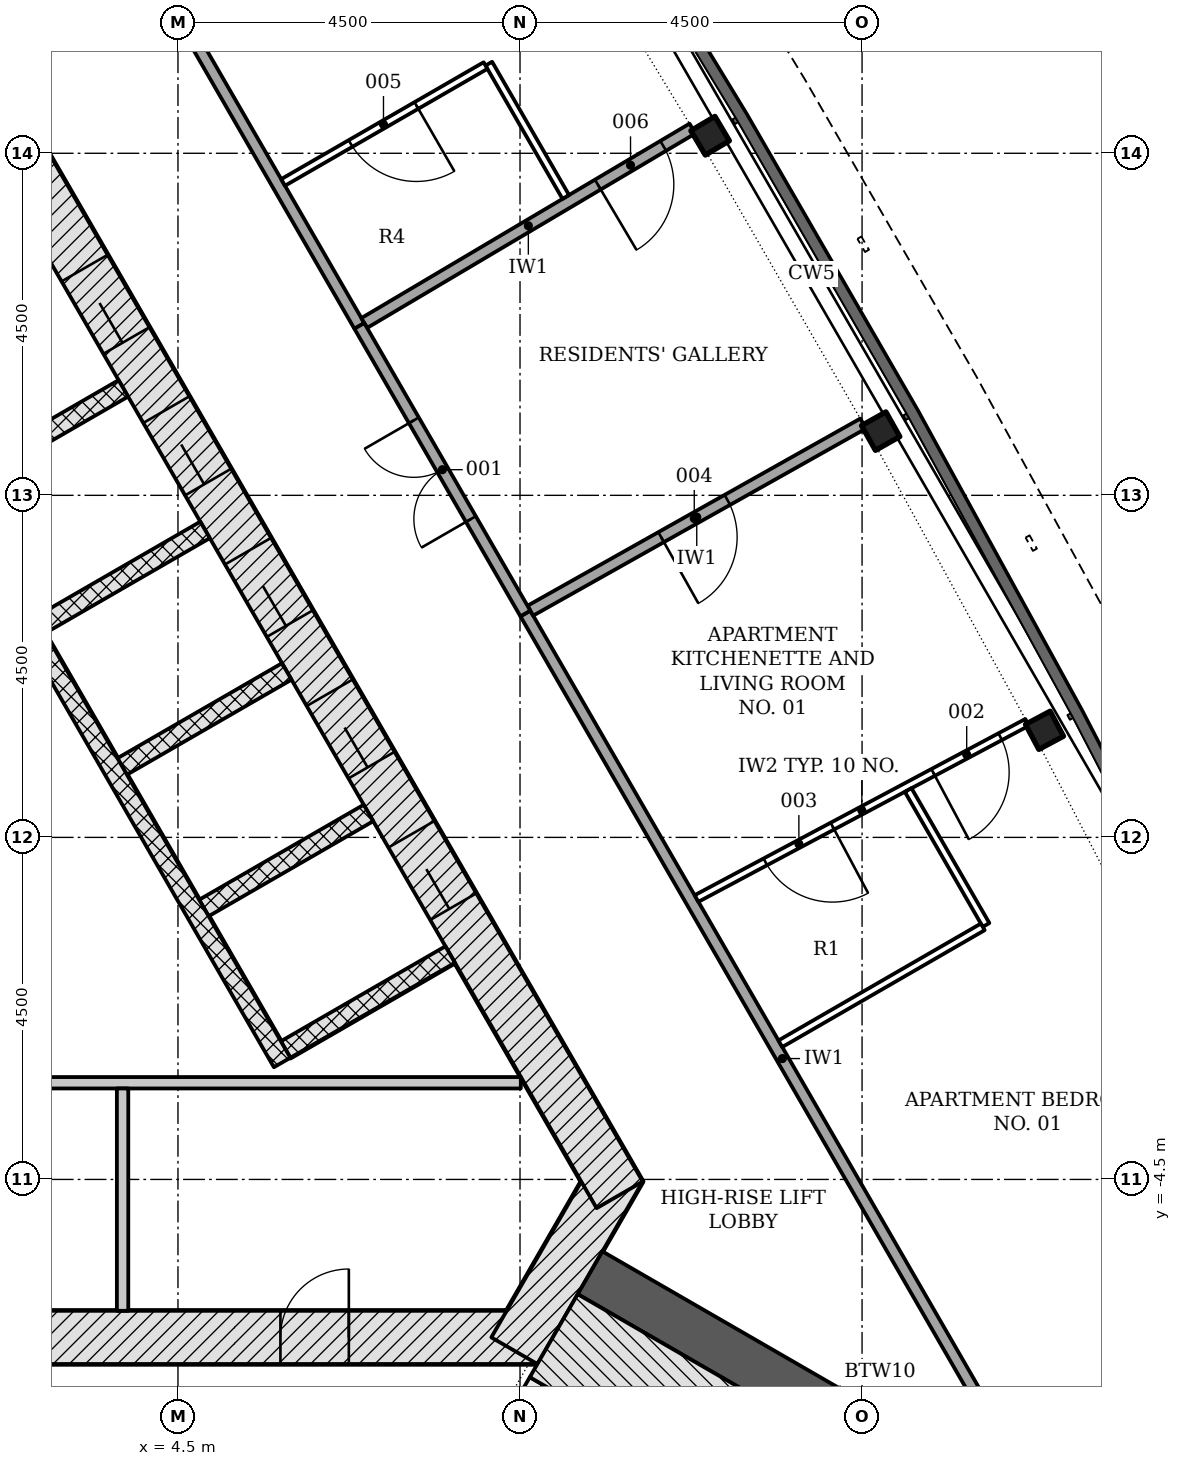
"""IFC4 building model, lengths in metres.
Left out: names, types, materials, properties, quantities, classifications, styles, units other than length and angle.
Written with IfcOpenShell. Run it as: python <this file> out.ifc"""

import sys

from ifc_helpers import new_model, si_unit, direction, frame, frame_2d, origin, origin_2d, place, context, subcontext, project, spatial, polyline, rectangle, i_section, outline, extrude, element, fill, save


model = new_model("IFC4")
c1 = context("Model", 3, precision=1e-05, world=origin(), true_north=direction((0.0, 1.0)))
c2 = subcontext(c1, "Body", "Model", "MODEL_VIEW")
j1 = project(units=[si_unit("LENGTHUNIT", "METRE"), si_unit("PLANEANGLEUNIT", "RADIAN")], contexts=[c1])
p1 = place(None, origin())
s1 = spatial("IfcSite", under=j1, at=p1, CompositionType="ELEMENT")
p2 = place(p1, origin())
s2 = spatial("IfcBuilding", under=s1, at=p2, CompositionType="ELEMENT")
p3 = place(p2, frame((0.0, 0.0, 232.8)))
s3 = spatial("IfcBuildingStorey", under=s2, at=p3, CompositionType="ELEMENT", Elevation=232.8)
p4 = place(p3, frame((-9.229, -6.578, -0.2), z_axis=(0.0, 0.0, 1.0), x_axis=(1.0, 0.0, 0.0)))
e1 = element("IfcWall", 1, at=p4, inside=s3, PredefinedType="SHEAR", context=c2, shape_type="SweptSolid", body=[
    extrude(rectangle(XDim=18.458, YDim=0.7, at=frame_2d((9.229, 0.0))), origin(), (0.0, 0.0, 1.0), 3.6),
])
p5 = place(p4, frame((7.5, 0.0, 0.2)))
e2 = element("IfcOpeningElement", 2, at=p5, cuts=e1, PredefinedType="OPENING", context=c2, shape_type="SweptSolid", body=[
    extrude(rectangle(XDim=1.0, YDim=2.1, at=frame_2d((0.5, 1.05))), frame((0.0, 0.36, 0.0), z_axis=(0.0, -1.0, 0.0), x_axis=(1.0, 0.0, 0.0)), (0.0, 0.0, 1.0), 0.72),
])
p6 = place(p4, frame((3.389, 0.0, 0.2)))
e3 = element("IfcOpeningElement", 3, at=p6, cuts=e1, PredefinedType="OPENING", context=c2, shape_type="SweptSolid", body=[
    extrude(rectangle(XDim=0.9, YDim=2.1, at=frame_2d((0.45, 1.05))), frame((0.0, 0.36, 0.0), z_axis=(0.0, -1.0, 0.0), x_axis=(1.0, 0.0, 0.0)), (0.0, 0.0, 1.0), 0.72),
])
p7 = place(p4, frame((10.363, 0.0, 0.2)))
e4 = element("IfcOpeningElement", 4, at=p7, cuts=e1, PredefinedType="OPENING", context=c2, shape_type="SweptSolid", body=[
    extrude(rectangle(XDim=1.0, YDim=2.1, at=frame_2d((0.5, 1.05))), frame((0.0, 0.36, 0.0), z_axis=(0.0, -1.0, 0.0), x_axis=(1.0, 0.0, 0.0)), (0.0, 0.0, 1.0), 0.72),
])
p8 = place(p4, frame((15.077, 0.0, 0.2)))
e5 = element("IfcOpeningElement", 5, at=p8, cuts=e1, PredefinedType="OPENING", context=c2, shape_type="SweptSolid", body=[
    extrude(rectangle(XDim=0.9, YDim=2.1, at=frame_2d((0.45, 1.05))), frame((0.0, 0.36, 0.0), z_axis=(0.0, -1.0, 0.0), x_axis=(1.0, 0.0, 0.0)), (0.0, 0.0, 1.0), 0.72),
])
p9 = place(p3, frame((8.926, -6.753, -0.2), z_axis=(0.0, 0.0, 1.0), x_axis=(0.500042739161, 0.866000726912, 0.0)))
e6 = element("IfcWall", 6, at=p9, inside=s3, PredefinedType="SHEAR", context=c2, shape_type="SweptSolid", body=[
    extrude(rectangle(XDim=2.771, YDim=0.7, at=frame_2d((1.386, 0.0))), origin(), (0.0, 0.0, 1.0), 3.6),
])
p10 = place(p3, frame((10.311, -4.703, -0.2), z_axis=(0.0, 0.0, 1.0), x_axis=(-0.500001446645, 0.866024568562, 0.0)))
e7 = element("IfcWall", 7, at=p10, inside=s3, PredefinedType="SHEAR", context=c2, shape_type="SweptSolid", body=[
    extrude(rectangle(XDim=18.458, YDim=0.7, at=frame_2d((9.229, 0.0))), origin(), (0.0, 0.0, 1.0), 3.6),
])
p11 = place(p10, frame((4.379, 0.0, 0.2)))
e8 = element("IfcOpeningElement", 8, at=p11, cuts=e7, PredefinedType="OPENING", context=c2, shape_type="SweptSolid", body=[
    extrude(rectangle(XDim=1.1, YDim=2.1, at=frame_2d((0.55, 1.05))), frame((0.0, 0.36, 0.0), z_axis=(0.0, -1.0, 0.0), x_axis=(1.0, 0.0, 0.0)), (0.0, 0.0, 1.0), 0.72),
])
p12 = place(p10, frame((6.529, 0.0, 0.2)))
e9 = element("IfcOpeningElement", 9, at=p12, cuts=e7, PredefinedType="OPENING", context=c2, shape_type="SweptSolid", body=[
    extrude(rectangle(XDim=1.1, YDim=2.1, at=frame_2d((0.55, 1.05))), frame((0.0, 0.36, 0.0), z_axis=(0.0, -1.0, 0.0), x_axis=(1.0, 0.0, 0.0)), (0.0, 0.0, 1.0), 0.72),
])
p13 = place(p10, frame((8.679, 0.0, 0.2)))
e10 = element("IfcOpeningElement", 10, at=p13, cuts=e7, PredefinedType="OPENING", context=c2, shape_type="SweptSolid", body=[
    extrude(rectangle(XDim=1.1, YDim=2.1, at=frame_2d((0.55, 1.05))), frame((0.0, 0.36, 0.0), z_axis=(0.0, -1.0, 0.0), x_axis=(1.0, 0.0, 0.0)), (0.0, 0.0, 1.0), 0.72),
])
p14 = place(p10, frame((10.829, 0.0, 0.2)))
e11 = element("IfcOpeningElement", 11, at=p14, cuts=e7, PredefinedType="OPENING", context=c2, shape_type="SweptSolid", body=[
    extrude(rectangle(XDim=1.1, YDim=2.1, at=frame_2d((0.55, 1.05))), frame((0.0, 0.36, 0.0), z_axis=(0.0, -1.0, 0.0), x_axis=(1.0, 0.0, 0.0)), (0.0, 0.0, 1.0), 0.72),
])
p15 = place(p10, frame((12.979, 0.0, 0.2)))
e12 = element("IfcOpeningElement", 12, at=p15, cuts=e7, PredefinedType="OPENING", context=c2, shape_type="SweptSolid", body=[
    extrude(rectangle(XDim=1.1, YDim=2.1, at=frame_2d((0.55, 1.05))), frame((0.0, 0.36, 0.0), z_axis=(0.0, -1.0, 0.0), x_axis=(1.0, 0.0, 0.0)), (0.0, 0.0, 1.0), 0.72),
])
p16 = place(p3, frame((9.922, -5.728, -0.2), z_axis=(0.0, 0.0, 1.0), x_axis=(0.866026891245, -0.499997423634, 0.0)))
e13 = element("IfcWall", 13, at=p16, inside=s3, PredefinedType="SHEAR", context=c2, shape_type="SweptSolid", body=[
    extrude(rectangle(XDim=7.506, YDim=0.65, at=frame_2d((3.753, 0.0))), origin(), (0.0, 0.0, 1.0), 3.6),
])
for number, where, z_axis, x_axis in (
    (14, (15.9, 1.409, -0.2), (0.0, 0.0, 1.0), (-0.47, 0.883, 0.0)),
    (15, (13.745, 5.345, -0.2), (0.0, 0.0, 1.0), (-0.49, 0.872, 0.0)),
    (16, (11.501, 9.231, -0.2), (0.0, 0.0, 1.0), (-0.51, 0.86, 0.0)),
):
    element("IfcColumn", number, at=place(p3, frame(where, z_axis=z_axis, x_axis=x_axis)), inside=s3, PredefinedType="COLUMN", context=c2, shape_type="SweptSolid", body=[
        extrude(i_section(OverallWidth=0.373, OverallDepth=0.368, WebThickness=0.015, FlangeThickness=0.024, FilletRadius=0.015, at=origin_2d()), origin(), (0.0, 0.0, 1.0), 3.6),
    ])
p17 = place(p3, origin())
e17 = element("IfcWall", 17, at=p17, inside=s3, PredefinedType="NOTDEFINED", context=c2, shape_type="SweptSolid", body=[
    extrude(outline(polyline([(11.244, -14.82), (14.364, -14.619), (15.772, -14.361), (17.092, -13.808), (18.261, -12.983), (19.227, -11.927), (19.942, -10.687), (20.375, -9.323), (20.504, -7.898), (20.323, -6.478), (19.842, -5.13), (18.457, -2.328), (18.188, -2.46), (19.565, -5.248), (20.03, -6.548), (20.202, -7.903), (20.079, -9.264), (19.666, -10.566), (18.983, -11.748), (18.062, -12.757), (16.945, -13.544), (15.686, -14.072), (14.327, -14.32), (11.225, -14.521), (11.244, -14.82)])), origin(), (0.0, 0.0, 1.0), 3.3),
])
for number, where, z_axis, x_axis in (
    (18, (8.081, -1.541, -0.2), (0.0, 0.0, 1.0), (-0.866, -0.5, 0.0)),
    (19, (7.006, 0.321, -0.2), (0.0, 0.0, 1.0), (-0.866, -0.5, 0.0)),
):
    element("IfcWall", number, at=place(p3, frame(where, z_axis=z_axis, x_axis=x_axis)), inside=s3, PredefinedType="PARTITIONING", context=c2, shape_type="SweptSolid", body=[
        extrude(rectangle(XDim=2.5, YDim=0.25, at=frame_2d((1.25, 0.0))), origin(), (0.0, 0.0, 1.0), 3.6),
    ])
p18 = place(p3, frame((5.931, 2.183, -0.2), z_axis=(0.0, 0.0, 1.0), x_axis=(-0.866047370643, -0.499961950354, 0.0)))
e20 = element("IfcWall", 20, at=p18, inside=s3, PredefinedType="PARTITIONING", context=c2, shape_type="SweptSolid", body=[
    extrude(rectangle(XDim=2.5, YDim=0.25, at=frame_2d((1.25, 0.0))), origin(), (0.0, 0.0, 1.0), 3.6),
])
for number, where, z_axis, x_axis in (
    (21, (4.856, 4.045, -0.2), (0.0, 0.0, 1.0), (-0.866, -0.5, 0.0)),
    (22, (3.781, 5.907, -0.2), (0.0, 0.0, 1.0), (-0.866, -0.5, 0.0)),
):
    element("IfcWall", number, at=place(p3, frame(where, z_axis=z_axis, x_axis=x_axis)), inside=s3, PredefinedType="PARTITIONING", context=c2, shape_type="SweptSolid", body=[
        extrude(rectangle(XDim=2.5, YDim=0.25, at=frame_2d((1.25, 0.0))), origin(), (0.0, 0.0, 1.0), 3.6),
    ])
p19 = place(p3, frame((5.87, -2.961, 0.0), z_axis=(0.0, 0.0, 1.0), x_axis=(-0.50000615651, 0.866021849293, 0.0)))
e23 = element("IfcWall", 23, at=p19, inside=s3, PredefinedType="PARTITIONING", context=c2, shape_type="SweptSolid", body=[
    extrude(rectangle(XDim=11.0, YDim=0.25, at=frame_2d((5.5, 0.0))), origin(), (0.0, 0.0, 1.0), 3.4),
])
p20 = place(p3, frame((-0.129, -3.228, 0.0), z_axis=(0.0, 0.0, 1.0), x_axis=(1.0, 0.0, 0.0)))
e24 = element("IfcWall", 24, at=p20, inside=s3, PredefinedType="PARTITIONING", context=c2, shape_type="SweptSolid", body=[
    extrude(rectangle(XDim=9.139, YDim=0.15, at=frame_2d((4.57, 0.0))), origin(), (0.0, 0.0, 1.0), 3.4),
])
p21 = place(p3, frame((3.771, -3.303, 0.0), z_axis=(0.0, 0.0, 1.0), x_axis=(0.0, -1.0, 0.0)))
e25 = element("IfcWall", 25, at=p21, inside=s3, PredefinedType="PARTITIONING", context=c2, shape_type="SweptSolid", body=[
    extrude(rectangle(XDim=2.925, YDim=0.15, at=frame_2d((1.462, 0.0))), origin(), (0.0, 0.0, 1.0), 3.4),
])
p22 = place(p3, frame((7.44, -10.226, -0.2), z_axis=(0.0, 0.0, 1.0), x_axis=(0.500022077904, 0.866012656725, 0.0)))
e26 = element("IfcWall", 26, at=p22, inside=s3, PredefinedType="SHEAR", context=c2, shape_type="SweptSolid", body=[
    extrude(rectangle(XDim=3.55, YDim=0.2, at=frame_2d((1.775, 0.0))), origin(), (0.0, 0.0, 1.0), 3.6),
])
p23 = place(p22, frame((1.175, 0.0, 0.2)))
e27 = element("IfcOpeningElement", 27, at=p23, cuts=e26, PredefinedType="OPENING", context=c2, shape_type="SweptSolid", body=[
    extrude(rectangle(XDim=1.2, YDim=2.1, at=frame_2d((0.6, 1.05))), frame((0.0, 0.11, 0.0), z_axis=(0.0, -1.0, 0.0), x_axis=(1.0, 0.0, 0.0)), (0.0, 0.0, 1.0), 0.22),
])
p24 = place(p3, frame((9.444, -6.555, -0.2), z_axis=(0.0, 0.0, 1.0), x_axis=(0.866020939036, -0.500007733091, 0.0)))
e28 = element("IfcWall", 28, at=p24, inside=s3, PredefinedType="SHEAR", context=c2, shape_type="SweptSolid", body=[
    extrude(rectangle(XDim=7.507, YDim=1.261, at=frame_2d((3.753, 0.0))), origin(), (0.0, 0.0, 1.0), 3.6),
])
p25 = place(p3, frame((15.832, -8.765, 0.0), z_axis=(0.0, 0.0, 1.0), x_axis=(-0.500008967739, 0.866020226196, 0.0)))
e29 = element("IfcWall", 29, at=p25, inside=s3, PredefinedType="PARTITIONING", context=c2, shape_type="SweptSolid", body=[
    extrude(rectangle(XDim=13.523, YDim=0.15, at=frame_2d((6.761, 0.0))), origin(), (0.0, 0.0, 1.0), 2.852),
])
p26 = place(p3, frame((6.886, 6.729, 0.0), z_axis=(0.0, 0.0, 1.0), x_axis=(-0.4999966759, 0.866027322946, 0.0)))
e30 = element("IfcWall", 30, at=p26, inside=s3, PredefinedType="PARTITIONING", context=c2, shape_type="SweptSolid", body=[
    extrude(rectangle(XDim=5.343, YDim=0.15, at=frame_2d((2.672, 0.0))), origin(), (0.0, 0.0, 1.0), 2.852),
])
p27 = place(p3, frame((13.514, 5.444, 0.0), z_axis=(0.0, 0.0, 1.0), x_axis=(-0.871644326388, -0.490138927525, 0.0)))
e31 = element("IfcWall", 31, at=p27, inside=s3, PredefinedType="PARTITIONING", context=c2, shape_type="SweptSolid", body=[
    extrude(rectangle(XDim=5.023, YDim=0.15, at=frame_2d((2.511, 0.0))), origin(), (0.0, 0.0, 1.0), 3.4),
])
p28 = place(p27, frame((2.049, 0.0, 0.0)))
e32 = element("IfcOpeningElement", 32, at=p28, cuts=e31, PredefinedType="OPENING", context=c2, shape_type="SweptSolid", body=[
    extrude(rectangle(XDim=1.0, YDim=2.1, at=frame_2d((0.5, 1.05))), frame((0.0, 0.085, 0.0), z_axis=(0.0, -1.0, 0.0), x_axis=(1.0, 0.0, 0.0)), (0.0, 0.0, 1.0), 0.17),
])
p29 = place(p3, frame((11.268, 9.325, 0.0), z_axis=(0.0, 0.0, 1.0), x_axis=(-0.860287582295, -0.509809058128, 0.0)))
e33 = element("IfcWall", 33, at=p29, inside=s3, PredefinedType="PARTITIONING", context=c2, shape_type="SweptSolid", body=[
    extrude(rectangle(XDim=5.018, YDim=0.15, at=frame_2d((2.509, 0.0))), origin(), (0.0, 0.0, 1.0), 3.4),
])
p30 = place(p29, frame((0.447, 0.0, 0.0)))
e34 = element("IfcOpeningElement", 34, at=p30, cuts=e33, PredefinedType="OPENING", context=c2, shape_type="SweptSolid", body=[
    extrude(rectangle(XDim=1.0, YDim=2.1, at=frame_2d((0.5, 1.05))), frame((0.0, 0.085, 0.0), z_axis=(0.0, -1.0, 0.0), x_axis=(1.0, 0.0, 0.0)), (0.0, 0.0, 1.0), 0.17),
])
p31 = place(p3, frame((9.071, 2.946, 0.0), z_axis=(0.0, 0.0, 1.0), x_axis=(-0.499991738058, 0.866030173766, 0.0)))
e35 = element("IfcWall", 35, at=p31, inside=s3, PredefinedType="PARTITIONING", context=c2, shape_type="SweptSolid", body=[
    extrude(rectangle(XDim=4.369, YDim=0.15, at=frame_2d((2.184, 0.0))), origin(), (0.0, 0.0, 1.0), 2.852),
])
p32 = place(p31, frame((1.434, 0.0, 0.0)))
e36 = element("IfcOpeningElement", 36, at=p32, cuts=e35, PredefinedType="OPENING", context=c2, shape_type="SweptSolid", body=[
    extrude(rectangle(XDim=1.5, YDim=2.1, at=frame_2d((0.75, 1.05))), frame((0.0, 0.085, 0.0), z_axis=(0.0, -1.0, 0.0), x_axis=(1.0, 0.0, 0.0)), (0.0, 0.0, 1.0), 0.17),
])
p33 = place(p3, frame((15.672, 1.514, 0.0), z_axis=(0.0, 0.0, 1.0), x_axis=(-0.882503735513, -0.47030538675, 0.0)))
e37 = element("IfcWall", 37, at=p33, inside=s3, PredefinedType="PARTITIONING", context=c2, shape_type="SweptSolid", body=[
    extrude(rectangle(XDim=4.928, YDim=0.1, at=frame_2d((2.464, 0.0))), origin(), (0.0, 0.0, 1.0), 3.4),
])
p34 = place(p33, frame((0.401, 0.0, 0.0)))
e38 = element("IfcOpeningElement", 38, at=p34, cuts=e37, PredefinedType="OPENING", context=c2, shape_type="SweptSolid", body=[
    extrude(rectangle(XDim=1.0, YDim=2.1, at=frame_2d((0.5, 1.05))), frame((0.0, 0.06, 0.0), z_axis=(0.0, -1.0, 0.0), x_axis=(1.0, 0.0, 0.0)), (0.0, 0.0, 1.0), 0.12),
])
p35 = place(p33, frame((2.903, 0.0, 0.0)))
e39 = element("IfcOpeningElement", 39, at=p35, cuts=e37, PredefinedType="OPENING", context=c2, shape_type="SweptSolid", body=[
    extrude(rectangle(XDim=1.0, YDim=2.1, at=frame_2d((0.5, 1.05))), frame((0.0, 0.06, 0.0), z_axis=(0.0, -1.0, 0.0), x_axis=(1.0, 0.0, 0.0)), (0.0, 0.0, 1.0), 0.12),
])
p36 = place(p3, frame((14.107, 0.623, 0.0), z_axis=(0.0, 0.0, 1.0), x_axis=(0.499956128963, -0.866050731258, 0.0)))
e40 = element("IfcWall", 40, at=p36, inside=s3, PredefinedType="PARTITIONING", context=c2, shape_type="SweptSolid", body=[
    extrude(rectangle(XDim=2.05, YDim=0.1, at=frame_2d((1.025, 0.0))), origin(), (0.0, 0.0, 1.0), 2.852),
])
p37 = place(p3, frame((15.088, -1.177, 0.0), z_axis=(0.0, 0.0, 1.0), x_axis=(-0.866016353143, -0.500015675843, 0.0)))
e41 = element("IfcWall", 41, at=p37, inside=s3, PredefinedType="PARTITIONING", context=c2, shape_type="SweptSolid", body=[
    extrude(rectangle(XDim=3.075, YDim=0.1, at=frame_2d((1.538, 0.0))), origin(), (0.0, 0.0, 1.0), 3.4),
])
p38 = place(p3, frame((9.602, 8.425, 0.0), z_axis=(0.0, 0.0, 1.0), x_axis=(-0.500080744026, 0.86597878118, 0.0)))
e42 = element("IfcWall", 42, at=p38, inside=s3, PredefinedType="PARTITIONING", context=c2, shape_type="SweptSolid", body=[
    extrude(rectangle(XDim=2.025, YDim=0.1, at=frame_2d((1.013, 0.0))), origin(), (0.0, 0.0, 1.0), 3.4),
])
p39 = place(p3, frame((8.546, 10.154, 0.0), z_axis=(0.0, 0.0, 1.0), x_axis=(-0.866016353143, -0.500015675843, 0.0)))
e43 = element("IfcWall", 43, at=p39, inside=s3, PredefinedType="PARTITIONING", context=c2, shape_type="SweptSolid", body=[
    extrude(rectangle(XDim=3.075, YDim=0.1, at=frame_2d((1.538, 0.0))), origin(), (0.0, 0.0, 1.0), 3.4),
])
p40 = place(p39, frame((1.05, 0.0, 0.0)))
e44 = element("IfcOpeningElement", 44, at=p40, cuts=e43, PredefinedType="OPENING", context=c2, shape_type="SweptSolid", body=[
    extrude(rectangle(XDim=1.0, YDim=2.1, at=frame_2d((0.5, 1.05))), frame((0.0, 0.06, 0.0), z_axis=(0.0, -1.0, 0.0), x_axis=(1.0, 0.0, 0.0)), (0.0, 0.0, 1.0), 0.12),
])
p41 = place(p11, origin())
e45 = element("IfcDoor", 45, at=p41, inside=s3, OperationType="DOUBLE_DOOR_SLIDING", PredefinedType="DOOR", context=c2, shape_type="SweptSolid", body=[
    extrude(rectangle(XDim=1.1, YDim=2.1, at=frame_2d((0.55, 1.05))), frame((0.0, 0.025, 0.0), z_axis=(0.0, -1.0, 0.0), x_axis=(1.0, 0.0, 0.0)), (0.0, 0.0, 1.0), 0.05),
])
fill(e8, e45)
p42 = place(p12, origin())
e46 = element("IfcDoor", 46, at=p42, inside=s3, OperationType="DOUBLE_DOOR_SLIDING", PredefinedType="DOOR", context=c2, shape_type="SweptSolid", body=[
    extrude(rectangle(XDim=1.1, YDim=2.1, at=frame_2d((0.55, 1.05))), frame((0.0, 0.025, 0.0), z_axis=(0.0, -1.0, 0.0), x_axis=(1.0, 0.0, 0.0)), (0.0, 0.0, 1.0), 0.05),
])
fill(e9, e46)
p43 = place(p13, origin())
e47 = element("IfcDoor", 47, at=p43, inside=s3, OperationType="DOUBLE_DOOR_SLIDING", PredefinedType="DOOR", context=c2, shape_type="SweptSolid", body=[
    extrude(rectangle(XDim=1.1, YDim=2.1, at=frame_2d((0.55, 1.05))), frame((0.0, 0.025, 0.0), z_axis=(0.0, -1.0, 0.0), x_axis=(1.0, 0.0, 0.0)), (0.0, 0.0, 1.0), 0.05),
])
fill(e10, e47)
p44 = place(p14, origin())
e48 = element("IfcDoor", 48, at=p44, inside=s3, OperationType="DOUBLE_DOOR_SLIDING", PredefinedType="DOOR", context=c2, shape_type="SweptSolid", body=[
    extrude(rectangle(XDim=1.1, YDim=2.1, at=frame_2d((0.55, 1.05))), frame((0.0, 0.025, 0.0), z_axis=(0.0, -1.0, 0.0), x_axis=(1.0, 0.0, 0.0)), (0.0, 0.0, 1.0), 0.05),
])
fill(e11, e48)
p45 = place(p15, origin())
e49 = element("IfcDoor", 49, at=p45, inside=s3, OperationType="DOUBLE_DOOR_SLIDING", PredefinedType="DOOR", context=c2, shape_type="SweptSolid", body=[
    extrude(rectangle(XDim=1.1, YDim=2.1, at=frame_2d((0.55, 1.05))), frame((0.0, 0.025, 0.0), z_axis=(0.0, -1.0, 0.0), x_axis=(1.0, 0.0, 0.0)), (0.0, 0.0, 1.0), 0.05),
])
fill(e12, e49)
p46 = place(p8, origin())
e50 = element("IfcDoor", 50, at=p46, inside=s3, OperationType="SINGLE_SWING_RIGHT", PredefinedType="DOOR", context=c2, shape_type="SweptSolid", body=[
    extrude(rectangle(XDim=0.9, YDim=2.1, at=frame_2d((0.45, 1.05))), frame((0.0, 0.075, 0.0), z_axis=(0.0, -1.0, 0.0), x_axis=(1.0, 0.0, 0.0)), (0.0, 0.0, 1.0), 0.15),
])
fill(e5, e50)
p47 = place(p32, origin())
e51 = element("IfcDoor", 51, at=p47, inside=s3, OperationType="DOUBLE_DOOR_SINGLE_SWING", PredefinedType="DOOR", context=c2, shape_type="SweptSolid", body=[
    extrude(rectangle(XDim=1.5, YDim=2.1, at=frame_2d((0.75, 1.05))), frame((0.0, 0.025, 0.0), z_axis=(0.0, -1.0, 0.0), x_axis=(1.0, 0.0, 0.0)), (0.0, 0.0, 1.0), 0.05),
])
fill(e36, e51)
p48 = place(p34, origin())
e52 = element("IfcDoor", 52, at=p48, inside=s3, OperationType="SINGLE_SWING_RIGHT", PredefinedType="DOOR", context=c2, shape_type="SweptSolid", body=[
    extrude(rectangle(XDim=1.0, YDim=2.1, at=frame_2d((0.5, 1.05))), frame((0.0, 0.025, 0.0), z_axis=(0.0, -1.0, 0.0), x_axis=(1.0, 0.0, 0.0)), (0.0, 0.0, 1.0), 0.05),
])
fill(e38, e52)
p49 = place(p35, origin())
e53 = element("IfcDoor", 53, at=p49, inside=s3, OperationType="SINGLE_SWING_LEFT", PredefinedType="DOOR", context=c2, shape_type="SweptSolid", body=[
    extrude(rectangle(XDim=1.0, YDim=2.1, at=frame_2d((0.5, 1.05))), frame((0.0, 0.025, 0.0), z_axis=(0.0, -1.0, 0.0), x_axis=(1.0, 0.0, 0.0)), (0.0, 0.0, 1.0), 0.05),
])
fill(e39, e53)
p50 = place(p28, origin())
e54 = element("IfcDoor", 54, at=p50, inside=s3, OperationType="SINGLE_SWING_RIGHT", PredefinedType="DOOR", context=c2, shape_type="SweptSolid", body=[
    extrude(rectangle(XDim=1.0, YDim=2.1, at=frame_2d((0.5, 1.05))), frame((0.0, 0.025, 0.0), z_axis=(0.0, -1.0, 0.0), x_axis=(1.0, 0.0, 0.0)), (0.0, 0.0, 1.0), 0.05),
])
fill(e32, e54)
p51 = place(p40, origin())
e55 = element("IfcDoor", 55, at=p51, inside=s3, OperationType="SINGLE_SWING_LEFT", PredefinedType="DOOR", context=c2, shape_type="SweptSolid", body=[
    extrude(rectangle(XDim=1.0, YDim=2.1, at=frame_2d((0.5, 1.05))), frame((0.0, 0.025, 0.0), z_axis=(0.0, -1.0, 0.0), x_axis=(1.0, 0.0, 0.0)), (0.0, 0.0, 1.0), 0.05),
])
fill(e44, e55)
p52 = place(p30, origin())
e56 = element("IfcDoor", 56, at=p52, inside=s3, OperationType="SINGLE_SWING_RIGHT", PredefinedType="DOOR", context=c2, shape_type="SweptSolid", body=[
    extrude(rectangle(XDim=1.0, YDim=2.1, at=frame_2d((0.5, 1.05))), frame((0.0, 0.025, 0.0), z_axis=(0.0, -1.0, 0.0), x_axis=(1.0, 0.0, 0.0)), (0.0, 0.0, 1.0), 0.05),
])
fill(e34, e56)
save(model, sys.argv[1])
